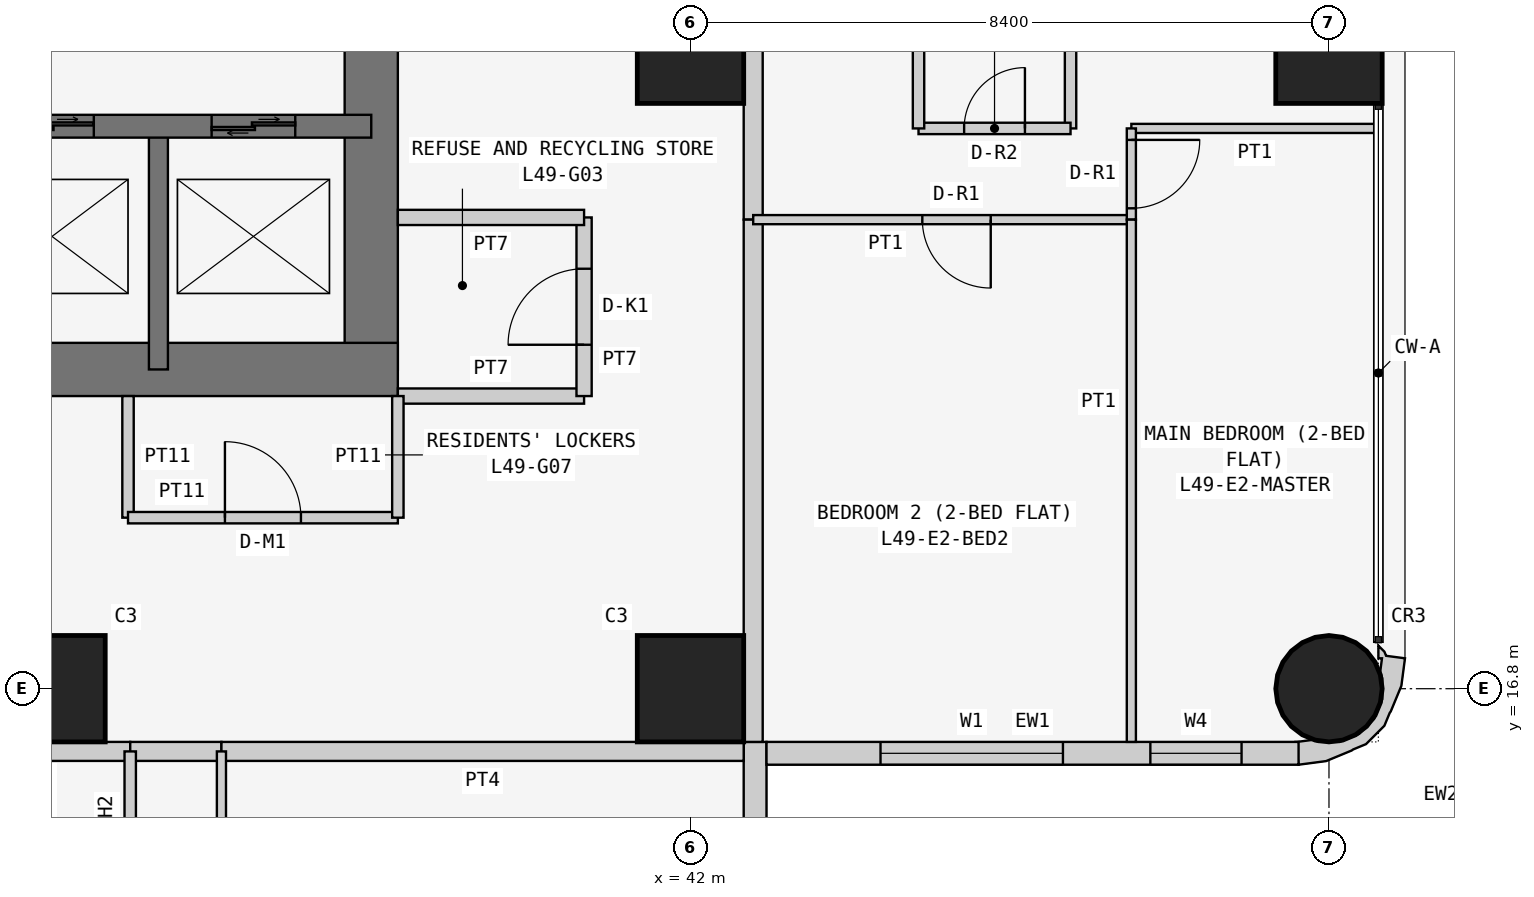
"""IFC4 building model, lengths in metres.
Left out: names, types, materials, properties, quantities, classifications, styles, units other than length and angle.
Written with IfcOpenShell. Run it as: python <this file> out.ifc"""

import sys

from ifc_helpers import new_model, si_unit, direction, frame, frame_2d, origin, origin_2d, place, context, subcontext, project, spatial, polyline, rectangle, circle, outline, extrude, element, fill, save


model = new_model("IFC4")
c1 = context("Model", 3, precision=1e-05, world=origin(), true_north=direction((0.0, 1.0)))
c2 = subcontext(c1, "Body", "Model", "MODEL_VIEW")
j1 = project(units=[si_unit("LENGTHUNIT", "METRE"), si_unit("PLANEANGLEUNIT", "RADIAN")], contexts=[c1])
p1 = place(None, origin())
s1 = spatial("IfcSite", under=j1, at=p1, CompositionType="ELEMENT")
p2 = place(p1, origin())
s2 = spatial("IfcBuilding", under=s1, at=p2, CompositionType="ELEMENT")
p3 = place(p2, frame((0.0, 0.0, 190.5)))
s3 = spatial("IfcBuildingStorey", under=s2, at=p3, CompositionType="ELEMENT", Elevation=190.5)
for number, where, z_axis, x_axis in (
    (1, (33.6, 16.8, 0.0), (0.0, 0.0, 1.0), (1.0, 0.0, 0.0)),
    (2, (42.0, 16.8, 0.0), (0.0, 0.0, 1.0), (1.0, 0.0, 0.0)),
    (3, (42.0, 25.2, 0.0), (0.0, 0.0, 1.0), (1.0, 0.0, 0.0)),
):
    element("IfcColumn", number, at=place(p3, frame(where, z_axis=z_axis, x_axis=x_axis)), inside=s3, PredefinedType="COLUMN", context=c2, shape_type="SweptSolid", body=[
        extrude(rectangle(XDim=1.4, YDim=1.4, at=origin_2d()), origin(), (0.0, 0.0, 1.0), 3.6),
    ])
p4 = place(p3, frame((50.4, 16.8, 0.0), z_axis=(0.0, 0.0, 1.0), x_axis=(1.0, 0.0, 0.0)))
e4 = element("IfcColumn", 4, at=p4, inside=s3, PredefinedType="COLUMN", context=c2, shape_type="SweptSolid", body=[
    extrude(circle(Radius=0.7, at=origin_2d()), origin(), (0.0, 0.0, 1.0), 3.6),
])
p5 = place(p3, frame((50.4, 25.2, 0.0), z_axis=(0.0, 0.0, 1.0), x_axis=(1.0, 0.0, 0.0)))
e5 = element("IfcColumn", 5, at=p5, inside=s3, PredefinedType="COLUMN", context=c2, shape_type="SweptSolid", body=[
    extrude(rectangle(XDim=1.4, YDim=1.4, at=origin_2d()), origin(), (0.0, 0.0, 1.0), 3.6),
])
p6 = place(p3, frame((21.0, 21.0, 0.0), z_axis=(0.0, 0.0, 1.0), x_axis=(1.0, 0.0, 0.0)))
e6 = element("IfcWall", 6, at=p6, inside=s3, PredefinedType="SHEAR", context=c2, shape_type="SweptSolid", body=[
    extrude(rectangle(XDim=17.15, YDim=0.7, at=frame_2d((8.575, 0.0))), origin(), (0.0, 0.0, 1.0), 3.6),
])
p7 = place(p3, frame((37.8, 21.0, 0.0), z_axis=(0.0, 0.0, 1.0), x_axis=(0.0, 1.0, 0.0)))
e7 = element("IfcWall", 7, at=p7, inside=s3, PredefinedType="SHEAR", context=c2, shape_type="SweptSolid", body=[
    extrude(rectangle(XDim=17.15, YDim=0.7, at=frame_2d((8.575, 0.0))), origin(), (0.0, 0.0, 1.0), 3.6),
])
p8 = place(p7, frame((5.2, 0.0, 0.0)))
e8 = element("IfcOpeningElement", 8, at=p8, cuts=e7, PredefinedType="OPENING", context=c2, shape_type="SweptSolid", body=[
    extrude(rectangle(XDim=1.2, YDim=2.1, at=frame_2d((0.6, 1.05))), frame((0.0, 0.36, 0.0), z_axis=(0.0, -1.0, 0.0), x_axis=(1.0, 0.0, 0.0)), (0.0, 0.0, 1.0), 0.72),
])
p9 = place(p3, frame((26.6, 24.2, 0.0), z_axis=(0.0, 0.0, 1.0), x_axis=(1.0, 0.0, 0.0)))
e9 = element("IfcWall", 9, at=p9, inside=s3, PredefinedType="SHEAR", context=c2, shape_type="SweptSolid", body=[
    extrude(rectangle(XDim=11.2, YDim=0.3, at=frame_2d((5.6, 0.0))), origin(), (0.0, 0.0, 1.0), 3.6),
])
p10 = place(p9, frame((0.913, 0.0, 0.0)))
e10 = element("IfcOpeningElement", 10, at=p10, cuts=e9, PredefinedType="OPENING", context=c2, shape_type="SweptSolid", body=[
    extrude(rectangle(XDim=1.0, YDim=2.1, at=frame_2d((0.5, 1.05))), frame((0.0, 0.16, 0.0), z_axis=(0.0, -1.0, 0.0), x_axis=(1.0, 0.0, 0.0)), (0.0, 0.0, 1.0), 0.32),
])
p11 = place(p9, frame((3.75, 0.0, 0.0)))
e11 = element("IfcOpeningElement", 11, at=p11, cuts=e9, PredefinedType="OPENING", context=c2, shape_type="SweptSolid", body=[
    extrude(rectangle(XDim=0.9, YDim=2.1, at=frame_2d((0.45, 1.05))), frame((0.0, 0.16, 0.0), z_axis=(0.0, -1.0, 0.0), x_axis=(1.0, 0.0, 0.0)), (0.0, 0.0, 1.0), 0.32),
])
p12 = place(p9, frame((6.45, 0.0, 0.0)))
e12 = element("IfcOpeningElement", 12, at=p12, cuts=e9, PredefinedType="OPENING", context=c2, shape_type="SweptSolid", body=[
    extrude(rectangle(XDim=1.1, YDim=2.1, at=frame_2d((0.55, 1.05))), frame((0.0, 0.16, 0.0), z_axis=(0.0, -1.0, 0.0), x_axis=(1.0, 0.0, 0.0)), (0.0, 0.0, 1.0), 0.32),
])
p13 = place(p9, frame((9.1, 0.0, 0.0)))
e13 = element("IfcOpeningElement", 13, at=p13, cuts=e9, PredefinedType="OPENING", context=c2, shape_type="SweptSolid", body=[
    extrude(rectangle(XDim=1.1, YDim=2.1, at=frame_2d((0.55, 1.05))), frame((0.0, 0.16, 0.0), z_axis=(0.0, -1.0, 0.0), x_axis=(1.0, 0.0, 0.0)), (0.0, 0.0, 1.0), 0.32),
])
p14 = place(p3, frame((35.0, 21.0, 0.0), z_axis=(0.0, 0.0, 1.0), x_axis=(0.0, 1.0, 0.0)))
e14 = element("IfcWall", 14, at=p14, inside=s3, PredefinedType="SHEAR", context=c2, shape_type="SweptSolid", body=[
    extrude(rectangle(XDim=3.2, YDim=0.25, at=frame_2d((1.6, 0.0))), origin(), (0.0, 0.0, 1.0), 3.6),
])
p15 = place(p3, frame((42.85, 8.8, 0.0), z_axis=(0.0, 0.0, 1.0), x_axis=(0.0, 1.0, 0.0)))
e15 = element("IfcWall", 15, at=p15, inside=s3, PredefinedType="SOLIDWALL", context=c2, shape_type="SweptSolid", body=[
    extrude(rectangle(XDim=7.3, YDim=0.3, at=frame_2d((3.65, 0.0))), origin(), (0.0, 0.0, 1.0), 3.45),
])
p16 = place(p15, frame((3.1, 0.0, 0.9)))
e16 = element("IfcOpeningElement", 16, at=p16, cuts=e15, PredefinedType="OPENING", context=c2, shape_type="SweptSolid", body=[
    extrude(rectangle(XDim=2.4, YDim=1.5, at=frame_2d((1.2, 0.75))), frame((0.0, 0.16, 0.0), z_axis=(0.0, -1.0, 0.0), x_axis=(1.0, 0.0, 0.0)), (0.0, 0.0, 1.0), 0.32),
])
p17 = place(p15, frame((0.75, 0.0, 0.9)))
e17 = element("IfcOpeningElement", 17, at=p17, cuts=e15, PredefinedType="OPENING", context=c2, shape_type="SweptSolid", body=[
    extrude(rectangle(XDim=1.2, YDim=1.5, at=frame_2d((0.6, 0.75))), frame((0.0, 0.16, 0.0), z_axis=(0.0, -1.0, 0.0), x_axis=(1.0, 0.0, 0.0)), (0.0, 0.0, 1.0), 0.32),
])
p18 = place(p3, frame((43.0, 15.95, 0.0), z_axis=(0.0, 0.0, 1.0), x_axis=(1.0, 0.0, 0.0)))
e18 = element("IfcWall", 18, at=p18, inside=s3, PredefinedType="SOLIDWALL", context=c2, shape_type="SweptSolid", body=[
    extrude(rectangle(XDim=7.0, YDim=0.3, at=frame_2d((3.5, 0.0))), origin(), (0.0, 0.0, 1.0), 3.45),
])
p19 = place(p18, frame((1.5, 0.0, 0.9)))
e19 = element("IfcOpeningElement", 19, at=p19, cuts=e18, PredefinedType="OPENING", context=c2, shape_type="SweptSolid", body=[
    extrude(rectangle(XDim=2.4, YDim=1.5, at=frame_2d((1.2, 0.75))), frame((0.0, 0.16, 0.0), z_axis=(0.0, -1.0, 0.0), x_axis=(1.0, 0.0, 0.0)), (0.0, 0.0, 1.0), 0.32),
])
p20 = place(p18, frame((5.05, 0.0, 0.9)))
e20 = element("IfcOpeningElement", 20, at=p20, cuts=e18, PredefinedType="OPENING", context=c2, shape_type="SweptSolid", body=[
    extrude(rectangle(XDim=1.2, YDim=1.5, at=frame_2d((0.6, 0.75))), frame((0.0, 0.16, 0.0), z_axis=(0.0, -1.0, 0.0), x_axis=(1.0, 0.0, 0.0)), (0.0, 0.0, 1.0), 0.32),
])
p21 = place(p3, frame((50.11, 16.076, 0.0), z_axis=(0.0, 0.0, 1.0), x_axis=(0.898030234854, -0.439933741929, 0.0)))
e21 = element("IfcWall", 21, at=p21, inside=s3, PredefinedType="SOLIDWALL", context=c2, shape_type="SweptSolid", body=[
    extrude(outline(polyline([(0.664, 1.577), (0.426, 1.497), (0.382, 1.536), (0.276, 1.572), (0.349, 1.423), (0.392, 1.444), (0.453, 1.261), (0.51, 1.211), (0.632, 0.961), (0.65, 0.683), (0.56, 0.419), (0.375, 0.21), (0.125, 0.087), (0.05, 0.082), (-0.128, -0.035), (-0.145, -0.044), (0.022, -0.296), (0.327, -0.094), (0.568, 0.18), (0.577, 0.199), (0.7, 0.337), (0.811, 0.661), (0.799, 0.846), (0.803, 0.866), (0.78, 1.231), (0.664, 1.577)])), origin(), (0.0, 0.0, 1.0), 3.45),
])
p22 = place(p3, frame((38.15, 20.65, 0.0), z_axis=(0.0, 0.0, 1.0), x_axis=(1.0, 0.0, 0.0)))
e22 = element("IfcWall", 22, at=p22, inside=s3, PredefinedType="PARTITIONING", context=c2, shape_type="SweptSolid", body=[
    extrude(rectangle(XDim=2.45, YDim=0.2, at=frame_2d((1.225, 0.0))), origin(), (0.0, 0.0, 1.0), 3.45),
])
p23 = place(p3, frame((40.6, 20.65, 0.0), z_axis=(0.0, 0.0, 1.0), x_axis=(0.0, 1.0, 0.0)))
e23 = element("IfcWall", 23, at=p23, inside=s3, PredefinedType="PARTITIONING", context=c2, shape_type="SweptSolid", body=[
    extrude(rectangle(XDim=2.35, YDim=0.2, at=frame_2d((1.175, 0.0))), origin(), (0.0, 0.0, 1.0), 3.45),
])
p24 = place(p23, frame((0.675, 0.0, 0.0)))
e24 = element("IfcOpeningElement", 24, at=p24, cuts=e23, PredefinedType="OPENING", context=c2, shape_type="SweptSolid", body=[
    extrude(rectangle(XDim=1.0, YDim=2.1, at=frame_2d((0.5, 1.05))), frame((0.0, 0.11, 0.0), z_axis=(0.0, -1.0, 0.0), x_axis=(1.0, 0.0, 0.0)), (0.0, 0.0, 1.0), 0.22),
])
p25 = place(p3, frame((40.6, 23.0, 0.0), z_axis=(0.0, 0.0, 1.0), x_axis=(-1.0, 0.0, 0.0)))
e25 = element("IfcWall", 25, at=p25, inside=s3, PredefinedType="PARTITIONING", context=c2, shape_type="SweptSolid", body=[
    extrude(rectangle(XDim=2.45, YDim=0.2, at=frame_2d((1.225, 0.0))), origin(), (0.0, 0.0, 1.0), 3.45),
])
p26 = place(p3, frame((34.6, 20.65, 0.0), z_axis=(0.0, 0.0, 1.0), x_axis=(0.0, -1.0, 0.0)))
e26 = element("IfcWall", 26, at=p26, inside=s3, PredefinedType="PARTITIONING", context=c2, shape_type="SweptSolid", body=[
    extrude(rectangle(XDim=1.6, YDim=0.15, at=frame_2d((0.8, 0.0))), origin(), (0.0, 0.0, 1.0), 3.45),
])
p27 = place(p3, frame((34.6, 19.05, 0.0), z_axis=(0.0, 0.0, 1.0), x_axis=(1.0, 0.0, 0.0)))
e27 = element("IfcWall", 27, at=p27, inside=s3, PredefinedType="PARTITIONING", context=c2, shape_type="SweptSolid", body=[
    extrude(rectangle(XDim=3.55, YDim=0.15, at=frame_2d((1.775, 0.0))), origin(), (0.0, 0.0, 1.0), 3.45),
])
p28 = place(p27, frame((1.275, 0.0, 0.0)))
e28 = element("IfcOpeningElement", 28, at=p28, cuts=e27, PredefinedType="OPENING", context=c2, shape_type="SweptSolid", body=[
    extrude(rectangle(XDim=1.0, YDim=2.1, at=frame_2d((0.5, 1.05))), frame((0.0, 0.085, 0.0), z_axis=(0.0, -1.0, 0.0), x_axis=(1.0, 0.0, 0.0)), (0.0, 0.0, 1.0), 0.17),
])
p29 = place(p3, frame((38.15, 19.05, 0.0), z_axis=(0.0, 0.0, 1.0), x_axis=(0.0, 1.0, 0.0)))
e29 = element("IfcWall", 29, at=p29, inside=s3, PredefinedType="PARTITIONING", context=c2, shape_type="SweptSolid", body=[
    extrude(rectangle(XDim=1.6, YDim=0.15, at=frame_2d((0.8, 0.0))), origin(), (0.0, 0.0, 1.0), 3.45),
])
p30 = place(p3, frame((42.825, 29.4, 0.0), z_axis=(0.0, 0.0, 1.0), x_axis=(0.0, -1.0, 0.0)))
e30 = element("IfcWall", 30, at=p30, inside=s3, PredefinedType="PARTITIONING", context=c2, shape_type="SweptSolid", body=[
    extrude(rectangle(XDim=6.429, YDim=0.25, at=frame_2d((3.214, 0.0))), origin(), (0.0, 0.0, 1.0), 3.45),
])
p31 = place(p30, frame((0.5, 0.0, 0.0)))
e31 = element("IfcOpeningElement", 31, at=p31, cuts=e30, PredefinedType="OPENING", context=c2, shape_type="SweptSolid", body=[
    extrude(rectangle(XDim=1.0, YDim=2.1, at=frame_2d((0.5, 1.05))), frame((0.0, 0.135, 0.0), z_axis=(0.0, -1.0, 0.0), x_axis=(1.0, 0.0, 0.0)), (0.0, 0.0, 1.0), 0.27),
])
p32 = place(p3, frame((42.825, 22.971, 0.0), z_axis=(0.0, 0.0, 1.0), x_axis=(0.0, -1.0, 0.0)))
e32 = element("IfcWall", 32, at=p32, inside=s3, PredefinedType="PARTITIONING", context=c2, shape_type="SweptSolid", body=[
    extrude(rectangle(XDim=6.871, YDim=0.25, at=frame_2d((3.436, 0.0))), origin(), (0.0, 0.0, 1.0), 3.45),
])
p33 = place(p3, frame((34.629, 15.975, 0.0), z_axis=(0.0, 0.0, 1.0), x_axis=(-1.0, 0.0, 0.0)))
e33 = element("IfcWall", 33, at=p33, inside=s3, PredefinedType="PARTITIONING", context=c2, shape_type="SweptSolid", body=[
    extrude(rectangle(XDim=2.629, YDim=0.25, at=frame_2d((1.314, 0.0))), origin(), (0.0, 0.0, 1.0), 3.45),
])
p34 = place(p3, frame((35.829, 15.975, 0.0), z_axis=(0.0, 0.0, 1.0), x_axis=(-1.0, 0.0, 0.0)))
e34 = element("IfcWall", 34, at=p34, inside=s3, PredefinedType="PARTITIONING", context=c2, shape_type="SweptSolid", body=[
    extrude(rectangle(XDim=1.2, YDim=0.25, at=frame_2d((0.6, 0.0))), origin(), (0.0, 0.0, 1.0), 3.45),
])
p35 = place(p3, frame((42.7, 15.975, 0.0), z_axis=(0.0, 0.0, 1.0), x_axis=(-1.0, 0.0, 0.0)))
e35 = element("IfcWall", 35, at=p35, inside=s3, PredefinedType="PARTITIONING", context=c2, shape_type="SweptSolid", body=[
    extrude(rectangle(XDim=6.871, YDim=0.25, at=frame_2d((3.436, 0.0))), origin(), (0.0, 0.0, 1.0), 3.45),
])
p36 = place(p3, frame((47.0, 29.4, 0.0), z_axis=(0.0, 0.0, 1.0), x_axis=(0.0, -1.0, 0.0)))
e36 = element("IfcWall", 36, at=p36, inside=s3, PredefinedType="PARTITIONING", context=c2, shape_type="SweptSolid", body=[
    extrude(rectangle(XDim=5.229, YDim=0.15, at=frame_2d((2.615, 0.0))), origin(), (0.0, 0.0, 1.0), 3.45),
])
p37 = place(p3, frame((47.0, 24.171, 0.0), z_axis=(0.0, 0.0, 1.0), x_axis=(-1.0, 0.0, 0.0)))
e37 = element("IfcWall", 37, at=p37, inside=s3, PredefinedType="PARTITIONING", context=c2, shape_type="SweptSolid", body=[
    extrude(rectangle(XDim=2.0, YDim=0.15, at=frame_2d((1.0, 0.0))), origin(), (0.0, 0.0, 1.0), 3.45),
])
p38 = place(p37, frame((0.6, 0.0, 0.0)))
e38 = element("IfcOpeningElement", 38, at=p38, cuts=e37, PredefinedType="OPENING", context=c2, shape_type="SweptSolid", body=[
    extrude(rectangle(XDim=0.8, YDim=2.1, at=frame_2d((0.4, 1.05))), frame((0.0, 0.085, 0.0), z_axis=(0.0, -1.0, 0.0), x_axis=(1.0, 0.0, 0.0)), (0.0, 0.0, 1.0), 0.17),
])
p39 = place(p3, frame((45.0, 24.171, 0.0), z_axis=(0.0, 0.0, 1.0), x_axis=(0.0, 1.0, 0.0)))
e39 = element("IfcWall", 39, at=p39, inside=s3, PredefinedType="PARTITIONING", context=c2, shape_type="SweptSolid", body=[
    extrude(rectangle(XDim=5.229, YDim=0.15, at=frame_2d((2.615, 0.0))), origin(), (0.0, 0.0, 1.0), 3.45),
])
p40 = place(p3, frame((47.8, 22.971, 0.0), z_axis=(0.0, 0.0, 1.0), x_axis=(-1.0, 0.0, 0.0)))
e40 = element("IfcWall", 40, at=p40, inside=s3, PredefinedType="PARTITIONING", context=c2, shape_type="SweptSolid", body=[
    extrude(rectangle(XDim=4.975, YDim=0.12, at=frame_2d((2.488, 0.0))), origin(), (0.0, 0.0, 1.0), 3.45),
])
p41 = place(p40, frame((1.85, 0.0, 0.0)))
e41 = element("IfcOpeningElement", 41, at=p41, cuts=e40, PredefinedType="OPENING", context=c2, shape_type="SweptSolid", body=[
    extrude(rectangle(XDim=0.9, YDim=2.1, at=frame_2d((0.45, 1.05))), frame((0.0, 0.07, 0.0), z_axis=(0.0, -1.0, 0.0), x_axis=(1.0, 0.0, 0.0)), (0.0, 0.0, 1.0), 0.14),
])
p42 = place(p3, frame((51.05, 24.171, 0.0), z_axis=(0.0, 0.0, 1.0), x_axis=(-1.0, 0.0, 0.0)))
e42 = element("IfcWall", 42, at=p42, inside=s3, PredefinedType="PARTITIONING", context=c2, shape_type="SweptSolid", body=[
    extrude(rectangle(XDim=3.25, YDim=0.12, at=frame_2d((1.625, 0.0))), origin(), (0.0, 0.0, 1.0), 3.45),
])
p43 = place(p3, frame((47.8, 24.171, 0.0), z_axis=(0.0, 0.0, 1.0), x_axis=(0.0, -1.0, 0.0)))
e43 = element("IfcWall", 43, at=p43, inside=s3, PredefinedType="PARTITIONING", context=c2, shape_type="SweptSolid", body=[
    extrude(rectangle(XDim=1.2, YDim=0.12, at=frame_2d((0.6, 0.0))), origin(), (0.0, 0.0, 1.0), 3.45),
])
p44 = place(p43, frame((0.151, 0.0, 0.0)))
e44 = element("IfcOpeningElement", 44, at=p44, cuts=e43, PredefinedType="OPENING", context=c2, shape_type="SweptSolid", body=[
    extrude(rectangle(XDim=0.9, YDim=2.1, at=frame_2d((0.45, 1.05))), frame((0.0, 0.07, 0.0), z_axis=(0.0, -1.0, 0.0), x_axis=(1.0, 0.0, 0.0)), (0.0, 0.0, 1.0), 0.14),
])
p45 = place(p3, frame((47.8, 22.971, 0.0), z_axis=(0.0, 0.0, 1.0), x_axis=(0.0, -1.0, 0.0)))
e45 = element("IfcWall", 45, at=p45, inside=s3, PredefinedType="PARTITIONING", context=c2, shape_type="SweptSolid", body=[
    extrude(rectangle(XDim=6.871, YDim=0.12, at=frame_2d((3.436, 0.0))), origin(), (0.0, 0.0, 1.0), 3.45),
])
p46 = place(p3, frame((34.629, 12.8, 0.0), z_axis=(0.0, 0.0, 1.0), x_axis=(0.0, 1.0, 0.0)))
e46 = element("IfcWall", 46, at=p46, inside=s3, PredefinedType="PARTITIONING", context=c2, shape_type="SweptSolid", body=[
    extrude(rectangle(XDim=3.175, YDim=0.15, at=frame_2d((1.587, 0.0))), origin(), (0.0, 0.0, 1.0), 3.45),
])
p47 = place(p3, frame((35.829, 15.975, 0.0), z_axis=(0.0, 0.0, 1.0), x_axis=(0.0, -1.0, 0.0)))
e47 = element("IfcWall", 47, at=p47, inside=s3, PredefinedType="PARTITIONING", context=c2, shape_type="SweptSolid", body=[
    extrude(rectangle(XDim=4.975, YDim=0.12, at=frame_2d((2.488, 0.0))), origin(), (0.0, 0.0, 1.0), 3.45),
])
p48 = place(p47, frame((2.125, 0.0, 0.0)))
e48 = element("IfcOpeningElement", 48, at=p48, cuts=e47, PredefinedType="OPENING", context=c2, shape_type="SweptSolid", body=[
    extrude(rectangle(XDim=0.9, YDim=2.1, at=frame_2d((0.45, 1.05))), frame((0.0, 0.07, 0.0), z_axis=(0.0, -1.0, 0.0), x_axis=(1.0, 0.0, 0.0)), (0.0, 0.0, 1.0), 0.14),
])
p49 = place(p19, origin())
e49 = element("IfcWindow", 49, at=p49, inside=s3, PartitioningType="SINGLE_PANEL", PredefinedType="WINDOW", context=c2, shape_type="SweptSolid", body=[
    extrude(rectangle(XDim=2.4, YDim=1.5, at=frame_2d((1.2, 0.75))), frame((0.0, 0.03, 0.0), z_axis=(0.0, -1.0, 0.0), x_axis=(1.0, 0.0, 0.0)), (0.0, 0.0, 1.0), 0.06),
])
fill(e19, e49)
p50 = place(p20, origin())
e50 = element("IfcWindow", 50, at=p50, inside=s3, PartitioningType="SINGLE_PANEL", PredefinedType="WINDOW", context=c2, shape_type="SweptSolid", body=[
    extrude(rectangle(XDim=1.2, YDim=1.5, at=frame_2d((0.6, 0.75))), frame((0.0, 0.03, 0.0), z_axis=(0.0, -1.0, 0.0), x_axis=(1.0, 0.0, 0.0)), (0.0, 0.0, 1.0), 0.06),
])
fill(e20, e50)
p51 = place(p24, origin())
e51 = element("IfcDoor", 51, at=p51, inside=s3, OperationType="SINGLE_SWING_LEFT", PredefinedType="DOOR", context=c2, shape_type="SweptSolid", body=[
    extrude(rectangle(XDim=1.0, YDim=2.1, at=frame_2d((0.5, 1.05))), frame((0.0, 0.025, 0.0), z_axis=(0.0, -1.0, 0.0), x_axis=(1.0, 0.0, 0.0)), (0.0, 0.0, 1.0), 0.05),
])
fill(e24, e51)
p52 = place(p28, origin())
e52 = element("IfcDoor", 52, at=p52, inside=s3, OperationType="SINGLE_SWING_LEFT", PredefinedType="DOOR", context=c2, shape_type="SweptSolid", body=[
    extrude(rectangle(XDim=1.0, YDim=2.1, at=frame_2d((0.5, 1.05))), frame((0.0, 0.025, 0.0), z_axis=(0.0, -1.0, 0.0), x_axis=(1.0, 0.0, 0.0)), (0.0, 0.0, 1.0), 0.05),
])
fill(e28, e52)
p53 = place(p38, frame((0.8, 0.0, 0.0), z_axis=(0.0, 0.0, 1.0), x_axis=(-1.0, 0.0, 0.0)))
e53 = element("IfcDoor", 53, at=p53, inside=s3, OperationType="SINGLE_SWING_RIGHT", PredefinedType="DOOR", context=c2, shape_type="SweptSolid", body=[
    extrude(rectangle(XDim=0.8, YDim=2.1, at=frame_2d((0.4, 1.05))), frame((0.0, 0.025, 0.0), z_axis=(0.0, -1.0, 0.0), x_axis=(1.0, 0.0, 0.0)), (0.0, 0.0, 1.0), 0.05),
])
fill(e38, e53)
p54 = place(p41, origin())
e54 = element("IfcDoor", 54, at=p54, inside=s3, OperationType="SINGLE_SWING_LEFT", PredefinedType="DOOR", context=c2, shape_type="SweptSolid", body=[
    extrude(rectangle(XDim=0.9, YDim=2.1, at=frame_2d((0.45, 1.05))), frame((0.0, 0.025, 0.0), z_axis=(0.0, -1.0, 0.0), x_axis=(1.0, 0.0, 0.0)), (0.0, 0.0, 1.0), 0.05),
])
fill(e41, e54)
p55 = place(p44, origin())
e55 = element("IfcDoor", 55, at=p55, inside=s3, OperationType="SINGLE_SWING_LEFT", PredefinedType="DOOR", context=c2, shape_type="SweptSolid", body=[
    extrude(rectangle(XDim=0.9, YDim=2.1, at=frame_2d((0.45, 1.05))), frame((0.0, 0.025, 0.0), z_axis=(0.0, -1.0, 0.0), x_axis=(1.0, 0.0, 0.0)), (0.0, 0.0, 1.0), 0.05),
])
fill(e44, e55)
p56 = place(p12, origin())
e56 = element("IfcDoor", 56, at=p56, inside=s3, OperationType="DOUBLE_DOOR_SLIDING", PredefinedType="DOOR", context=c2, shape_type="SweptSolid", body=[
    extrude(rectangle(XDim=1.1, YDim=2.1, at=frame_2d((0.55, 1.05))), frame((0.0, 0.025, 0.0), z_axis=(0.0, -1.0, 0.0), x_axis=(1.0, 0.0, 0.0)), (0.0, 0.0, 1.0), 0.05),
])
fill(e12, e56)
p57 = place(p13, origin())
e57 = element("IfcDoor", 57, at=p57, inside=s3, OperationType="DOUBLE_DOOR_SLIDING", PredefinedType="DOOR", context=c2, shape_type="SweptSolid", body=[
    extrude(rectangle(XDim=1.1, YDim=2.1, at=frame_2d((0.55, 1.05))), frame((0.0, 0.025, 0.0), z_axis=(0.0, -1.0, 0.0), x_axis=(1.0, 0.0, 0.0)), (0.0, 0.0, 1.0), 0.05),
])
fill(e13, e57)
save(model, sys.argv[1])
